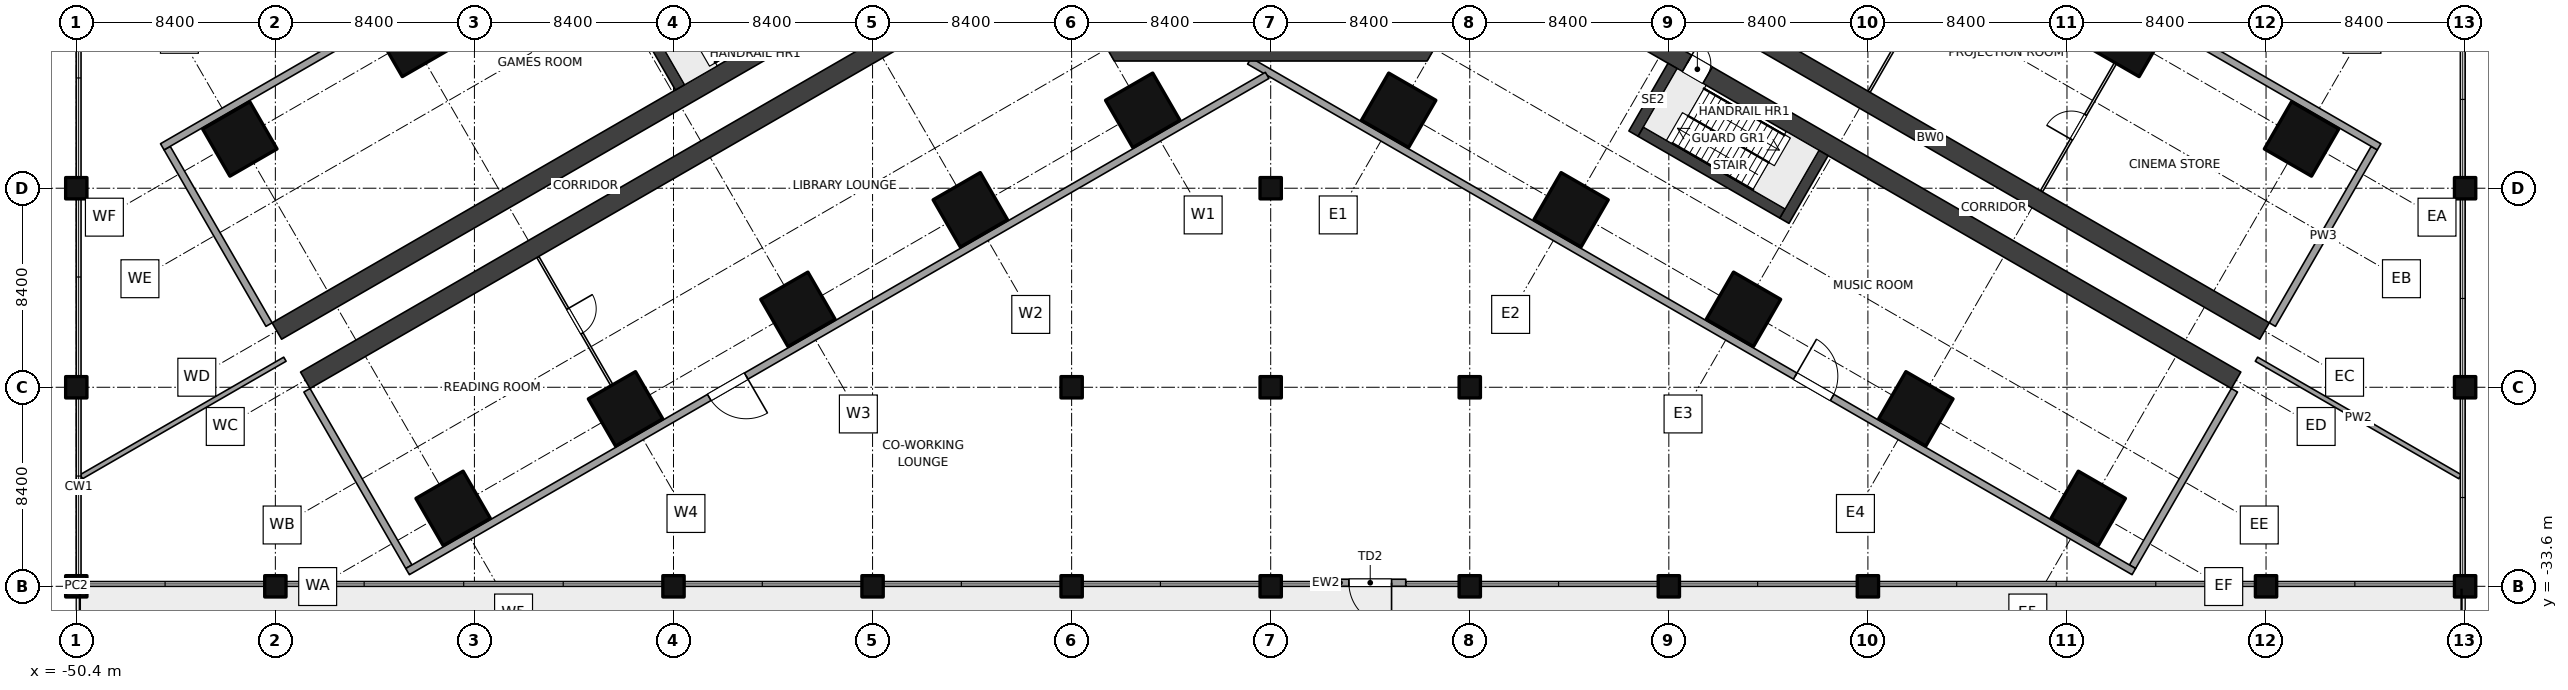
"""IFC4 building model, lengths in metres.
Left out: names, types, materials, properties, quantities, classifications, styles, units other than length and angle.
Written with IfcOpenShell. Run it as: python <this file> out.ifc"""

import sys

from ifc_helpers import new_model, si_unit, direction, frame, frame_2d, origin, origin_2d, place, context, subcontext, project, spatial, polyline, rectangle, outline, extrude, element, fill, save


model = new_model("IFC4")
c1 = context("Model", 3, precision=1e-05, world=origin(), true_north=direction((0.0, 1.0)))
c2 = subcontext(c1, "Body", "Model", "MODEL_VIEW")
j1 = project(units=[si_unit("LENGTHUNIT", "METRE"), si_unit("PLANEANGLEUNIT", "RADIAN")], contexts=[c1])
p1 = place(None, origin())
s1 = spatial("IfcSite", under=j1, at=p1, CompositionType="ELEMENT")
p2 = place(p1, origin())
s2 = spatial("IfcBuilding", under=s1, at=p2, CompositionType="ELEMENT")
p3 = place(p2, frame((0.0, 0.0, 6.0)))
s3 = spatial("IfcBuildingStorey", under=s2, at=p3, CompositionType="ELEMENT", Elevation=6.0)
for number, where, z_axis, x_axis in (
    (1, (-5.4, -13.51, 0.0), (0.0, 0.0, 1.0), (-0.5, 0.866, 0.0)),
    (2, (-12.675, -17.71, 0.0), (0.0, 0.0, 1.0), (-0.5, 0.866, 0.0)),
    (3, (-19.949, -21.91, 0.0), (0.0, 0.0, 1.0), (-0.5, 0.866, 0.0)),
    (4, (-27.224, -26.11, 0.0), (0.0, 0.0, 1.0), (-0.5, 0.866, 0.0)),
    (5, (-36.224, -10.521, 0.0), (0.0, 0.0, 1.0), (-0.5, 0.866, 0.0)),
    (6, (-34.499, -30.31, 0.0), (0.0, 0.0, 1.0), (-0.5, 0.866, 0.0)),
    (7, (-43.499, -14.721, 0.0), (0.0, 0.0, 1.0), (-0.5, 0.866, 0.0)),
    (8, (5.4, -13.51, 0.0), (0.0, 0.0, 1.0), (-0.5, -0.866, 0.0)),
    (9, (12.675, -17.71, 0.0), (0.0, 0.0, 1.0), (-0.5, -0.866, 0.0)),
    (10, (19.949, -21.91, 0.0), (0.0, 0.0, 1.0), (-0.5, -0.866, 0.0)),
    (11, (36.224, -10.521, 0.0), (0.0, 0.0, 1.0), (-0.5, -0.866, 0.0)),
    (12, (27.224, -26.11, 0.0), (0.0, 0.0, 1.0), (-0.5, -0.866, 0.0)),
    (13, (43.499, -14.721, 0.0), (0.0, 0.0, 1.0), (-0.5, -0.866, 0.0)),
    (14, (34.499, -30.31, 0.0), (0.0, 0.0, 1.0), (-0.5, -0.866, 0.0)),
):
    element("IfcColumn", number, at=place(p3, frame(where, z_axis=z_axis, x_axis=x_axis)), inside=s3, PredefinedType="COLUMN", context=c2, shape_type="SweptSolid", body=[
        extrude(rectangle(XDim=2.3, YDim=2.3, at=origin_2d()), origin(), (0.0, 0.0, 1.0), 5.0),
    ])
for number, where, z_axis, x_axis in (
    (15, (-50.4, -33.6, 0.0), (0.0, 0.0, 1.0), (1.0, 0.0, 0.0)),
    (16, (-50.4, -25.2, 0.0), (0.0, 0.0, 1.0), (1.0, 0.0, 0.0)),
    (17, (-50.4, -16.8, 0.0), (0.0, 0.0, 1.0), (1.0, 0.0, 0.0)),
    (18, (-42.0, -33.6, 0.0), (0.0, 0.0, 1.0), (1.0, 0.0, 0.0)),
    (19, (-25.2, -33.6, 0.0), (0.0, 0.0, 1.0), (1.0, 0.0, 0.0)),
    (20, (-16.8, -33.6, 0.0), (0.0, 0.0, 1.0), (1.0, 0.0, 0.0)),
    (21, (-8.4, -33.6, 0.0), (0.0, 0.0, 1.0), (1.0, 0.0, 0.0)),
    (22, (-8.4, -25.2, 0.0), (0.0, 0.0, 1.0), (1.0, 0.0, 0.0)),
    (23, (0.0, -33.6, 0.0), (0.0, 0.0, 1.0), (1.0, 0.0, 0.0)),
    (24, (0.0, -25.2, 0.0), (0.0, 0.0, 1.0), (1.0, 0.0, 0.0)),
    (25, (0.0, -16.8, 0.0), (0.0, 0.0, 1.0), (1.0, 0.0, 0.0)),
    (26, (8.4, -33.6, 0.0), (0.0, 0.0, 1.0), (1.0, 0.0, 0.0)),
    (27, (8.4, -25.2, 0.0), (0.0, 0.0, 1.0), (1.0, 0.0, 0.0)),
    (28, (16.8, -33.6, 0.0), (0.0, 0.0, 1.0), (1.0, 0.0, 0.0)),
    (29, (25.2, -33.6, 0.0), (0.0, 0.0, 1.0), (1.0, 0.0, 0.0)),
    (30, (42.0, -33.6, 0.0), (0.0, 0.0, 1.0), (1.0, 0.0, 0.0)),
    (31, (50.4, -33.6, 0.0), (0.0, 0.0, 1.0), (1.0, 0.0, 0.0)),
    (32, (50.4, -25.2, 0.0), (0.0, 0.0, 1.0), (1.0, 0.0, 0.0)),
    (33, (50.4, -16.8, 0.0), (0.0, 0.0, 1.0), (1.0, 0.0, 0.0)),
):
    element("IfcColumn", number, at=place(p3, frame(where, z_axis=z_axis, x_axis=x_axis)), inside=s3, PredefinedType="COLUMN", context=c2, shape_type="SweptSolid", body=[
        extrude(rectangle(XDim=0.9, YDim=0.9, at=origin_2d()), origin(), (0.0, 0.0, 1.0), 5.0),
    ])
p4 = place(p3, origin())
e34 = element("IfcWall", 34, at=p4, inside=s3, PredefinedType="SHEAR", context=c2, shape_type="SweptSolid", body=[
    extrude(outline(polyline([(-6.6, -11.432), (6.6, -11.432), (6.86, -10.981), (6.08, -10.531), (-6.08, -10.531), (-6.86, -10.981), (-6.6, -11.432)])), origin(), (0.0, 0.0, 1.0), 5.0),
])
p5 = place(p3, frame((-8.91, -6.53, 0.0), z_axis=(0.0, 0.0, 1.0), x_axis=(-0.866025284237, -0.500000207062, 0.0)))
e35 = element("IfcWall", 35, at=p5, inside=s3, PredefinedType="SHEAR", context=c2, shape_type="SweptSolid", body=[
    extrude(rectangle(XDim=36.75, YDim=0.8, at=frame_2d((18.375, 0.0))), origin(), (0.0, 0.0, 1.0), 5.0),
])
p6 = place(p5, frame((2.85, 0.0, 0.0)))
e36 = element("IfcOpeningElement", 36, at=p6, cuts=e35, PredefinedType="OPENING", context=c2, shape_type="SweptSolid", body=[
    extrude(rectangle(XDim=1.2, YDim=2.1, at=frame_2d((0.6, 1.05))), frame((0.0, 0.41, 0.0), z_axis=(0.0, -1.0, 0.0), x_axis=(1.0, 0.0, 0.0)), (0.0, 0.0, 1.0), 0.82),
])
p7 = place(p3, frame((-10.11, -4.451, 0.0), z_axis=(0.0, 0.0, 1.0), x_axis=(-0.866025284237, -0.500000207062, 0.0)))
e37 = element("IfcWall", 37, at=p7, inside=s3, PredefinedType="SHEAR", context=c2, shape_type="SweptSolid", body=[
    extrude(rectangle(XDim=36.75, YDim=0.8, at=frame_2d((18.375, 0.0))), origin(), (0.0, 0.0, 1.0), 5.0),
])
p8 = place(p7, frame((10.0, 0.0, 0.0)))
e38 = element("IfcOpeningElement", 38, at=p8, cuts=e37, PredefinedType="OPENING", context=c2, shape_type="SweptSolid", body=[
    extrude(rectangle(XDim=1.0, YDim=2.1, at=frame_2d((0.5, 1.05))), frame((0.0, 0.41, 0.0), z_axis=(0.0, -1.0, 0.0), x_axis=(1.0, 0.0, 0.0)), (0.0, 0.0, 1.0), 0.82),
])
p9 = place(p7, frame((2.85, 0.0, 0.0)))
e39 = element("IfcOpeningElement", 39, at=p9, cuts=e37, PredefinedType="OPENING", context=c2, shape_type="SweptSolid", body=[
    extrude(rectangle(XDim=1.2, YDim=2.1, at=frame_2d((0.6, 1.05))), frame((0.0, 0.41, 0.0), z_axis=(0.0, -1.0, 0.0), x_axis=(1.0, 0.0, 0.0)), (0.0, 0.0, 1.0), 0.82),
])
p10 = place(p3, frame((10.11, -4.451, 0.0), z_axis=(0.0, 0.0, 1.0), x_axis=(0.866025284237, -0.500000207062, 0.0)))
e40 = element("IfcWall", 40, at=p10, inside=s3, PredefinedType="SHEAR", context=c2, shape_type="SweptSolid", body=[
    extrude(rectangle(XDim=36.75, YDim=0.8, at=frame_2d((18.375, 0.0))), origin(), (0.0, 0.0, 1.0), 5.0),
])
p11 = place(p10, frame((2.85, 0.0, 0.0)))
e41 = element("IfcOpeningElement", 41, at=p11, cuts=e40, PredefinedType="OPENING", context=c2, shape_type="SweptSolid", body=[
    extrude(rectangle(XDim=1.2, YDim=2.1, at=frame_2d((0.6, 1.05))), frame((0.0, 0.41, 0.0), z_axis=(0.0, -1.0, 0.0), x_axis=(1.0, 0.0, 0.0)), (0.0, 0.0, 1.0), 0.82),
])
p12 = place(p3, frame((8.91, -6.53, 0.0), z_axis=(0.0, 0.0, 1.0), x_axis=(0.866025284237, -0.500000207062, 0.0)))
e42 = element("IfcWall", 42, at=p12, inside=s3, PredefinedType="SHEAR", context=c2, shape_type="SweptSolid", body=[
    extrude(rectangle(XDim=36.75, YDim=0.8, at=frame_2d((18.375, 0.0))), origin(), (0.0, 0.0, 1.0), 5.0),
])
p13 = place(p12, frame((10.0, 0.0, 0.0)))
e43 = element("IfcOpeningElement", 43, at=p13, cuts=e42, PredefinedType="OPENING", context=c2, shape_type="SweptSolid", body=[
    extrude(rectangle(XDim=1.0, YDim=2.1, at=frame_2d((0.5, 1.05))), frame((0.0, 0.41, 0.0), z_axis=(0.0, -1.0, 0.0), x_axis=(1.0, 0.0, 0.0)), (0.0, 0.0, 1.0), 0.82),
])
p14 = place(p12, frame((2.85, 0.0, 0.0)))
e44 = element("IfcOpeningElement", 44, at=p14, cuts=e42, PredefinedType="OPENING", context=c2, shape_type="SweptSolid", body=[
    extrude(rectangle(XDim=1.2, YDim=2.1, at=frame_2d((0.6, 1.05))), frame((0.0, 0.41, 0.0), z_axis=(0.0, -1.0, 0.0), x_axis=(1.0, 0.0, 0.0)), (0.0, 0.0, 1.0), 0.82),
])
p15 = place(p3, frame((5.7, -33.45, 0.0), z_axis=(0.0, 0.0, 1.0), x_axis=(-1.0, 0.0, 0.0)))
e45 = element("IfcWall", 45, at=p15, inside=s3, PredefinedType="SOLIDWALL", context=c2, shape_type="SweptSolid", body=[
    extrude(rectangle(XDim=3.0, YDim=0.3, at=frame_2d((1.5, 0.0))), origin(), (0.0, 0.0, 1.0), 3.7),
])
p16 = place(p15, frame((0.6, 0.0, 0.0)))
e46 = element("IfcOpeningElement", 46, at=p16, cuts=e45, PredefinedType="OPENING", context=c2, shape_type="SweptSolid", body=[
    extrude(rectangle(XDim=1.8, YDim=2.4, at=frame_2d((0.9, 1.2))), frame((0.0, 0.16, 0.0), z_axis=(0.0, -1.0, 0.0), x_axis=(1.0, 0.0, 0.0)), (0.0, 0.0, 1.0), 0.32),
])
p17 = place(p3, frame((-30.924, -19.701, 0.0), z_axis=(0.0, 0.0, 1.0), x_axis=(0.500004234368, -0.866022959057, 0.0)))
e47 = element("IfcWall", 47, at=p17, inside=s3, PredefinedType="PARTITIONING", context=c2, shape_type="SweptSolid", body=[
    extrude(rectangle(XDim=6.25, YDim=0.1, at=frame_2d((3.125, 0.0))), origin(), (0.0, 0.0, 1.0), 2.9),
])
p18 = place(p17, frame((2.525, 0.0, 0.0)))
e48 = element("IfcOpeningElement", 48, at=p18, cuts=e47, PredefinedType="OPENING", context=c2, shape_type="SweptSolid", body=[
    extrude(rectangle(XDim=1.2, YDim=2.1, at=frame_2d((0.6, 1.05))), frame((0.0, 0.06, 0.0), z_axis=(0.0, -1.0, 0.0), x_axis=(1.0, 0.0, 0.0)), (0.0, 0.0, 1.0), 0.12),
])
p19 = place(p3, frame((25.249, -12.73, 0.0), z_axis=(0.0, 0.0, 1.0), x_axis=(0.499987320047, 0.866032724435, 0.0)))
e49 = element("IfcWall", 49, at=p19, inside=s3, PredefinedType="PARTITIONING", context=c2, shape_type="SweptSolid", body=[
    extrude(rectangle(XDim=6.25, YDim=0.1, at=frame_2d((3.125, 0.0))), origin(), (0.0, 0.0, 1.0), 2.9),
])
p20 = place(p19, frame((2.525, 0.0, 0.0)))
e50 = element("IfcOpeningElement", 50, at=p20, cuts=e49, PredefinedType="OPENING", context=c2, shape_type="SweptSolid", body=[
    extrude(rectangle(XDim=1.2, YDim=2.1, at=frame_2d((0.6, 1.05))), frame((0.0, 0.06, 0.0), z_axis=(0.0, -1.0, 0.0), x_axis=(1.0, 0.0, 0.0)), (0.0, 0.0, 1.0), 0.12),
])
p21 = place(p3, frame((32.524, -16.93, 0.0), z_axis=(0.0, 0.0, 1.0), x_axis=(0.500004234368, 0.866022959057, 0.0)))
e51 = element("IfcWall", 51, at=p21, inside=s3, PredefinedType="PARTITIONING", context=c2, shape_type="SweptSolid", body=[
    extrude(rectangle(XDim=6.25, YDim=0.1, at=frame_2d((3.125, 0.0))), origin(), (0.0, 0.0, 1.0), 2.9),
])
p22 = place(p21, frame((2.525, 0.0, 0.0)))
e52 = element("IfcOpeningElement", 52, at=p22, cuts=e51, PredefinedType="OPENING", context=c2, shape_type="SweptSolid", body=[
    extrude(rectangle(XDim=1.2, YDim=2.1, at=frame_2d((0.6, 1.05))), frame((0.0, 0.06, 0.0), z_axis=(0.0, -1.0, 0.0), x_axis=(1.0, 0.0, 0.0)), (0.0, 0.0, 1.0), 0.12),
])
for number, where, z_axis, x_axis in (
    (53, (-41.596, -24.016, 0.0), (0.0, 0.0, 1.0), (-0.866, -0.5, 0.0)),
    (54, (41.596, -24.016, 0.0), (0.0, 0.0, 1.0), (0.866, -0.5, 0.0)),
):
    element("IfcWall", number, at=place(p3, frame(where, z_axis=z_axis, x_axis=x_axis)), inside=s3, PredefinedType="SOLIDWALL", context=c2, shape_type="SweptSolid", body=[
        extrude(rectangle(XDim=9.919, YDim=0.2, at=frame_2d((4.96, 0.0))), origin(), (0.0, 0.0, 1.0), 4.7),
    ])
for number, where, z_axis, x_axis in (
    (55, (-40.667, -25.326, 0.0), (0.0, 0.0, 1.0), (0.5, -0.866, 0.0)),
    (56, (-42.267, -22.555, 0.0), (0.0, 0.0, 1.0), (-0.5, 0.866, 0.0)),
    (57, (42.267, -22.555, 0.0), (0.0, 0.0, 1.0), (0.5, 0.866, 0.0)),
    (58, (40.667, -25.326, 0.0), (0.0, 0.0, 1.0), (-0.5, -0.866, 0.0)),
):
    element("IfcWall", number, at=place(p3, frame(where, z_axis=z_axis, x_axis=x_axis)), inside=s3, PredefinedType="SOLIDWALL", context=c2, shape_type="SweptSolid", body=[
        extrude(rectangle(XDim=8.6, YDim=0.3, at=frame_2d((4.3, 0.0))), origin(), (0.0, 0.0, 1.0), 3.1),
    ])
p23 = place(p3, frame((-0.15, -12.038, 0.0), z_axis=(0.0, 0.0, 1.0), x_axis=(-0.866026292622, -0.499998460486, 0.0)))
e59 = element("IfcWall", 59, at=p23, inside=s3, PredefinedType="SOLIDWALL", context=c2, shape_type="SweptSolid", body=[
    extrude(rectangle(XDim=41.883, YDim=0.3, at=frame_2d((20.941, 0.0))), origin(), (0.0, 0.0, 1.0), 4.7),
])
p24 = place(p23, frame((25.383, 0.0, 0.0)))
e60 = element("IfcOpeningElement", 60, at=p24, cuts=e59, PredefinedType="OPENING", context=c2, shape_type="SweptSolid", body=[
    extrude(rectangle(XDim=1.8, YDim=2.4, at=frame_2d((0.9, 1.2))), frame((0.0, 0.16, 0.0), z_axis=(0.0, -1.0, 0.0), x_axis=(1.0, 0.0, 0.0)), (0.0, 0.0, 1.0), 0.32),
])
p25 = place(p3, frame((-9.45, 6.495, 0.0), z_axis=(0.0, 0.0, 1.0), x_axis=(-0.866025301493, -0.500000177174, 0.0)))
e61 = element("IfcWall", 61, at=p25, inside=s3, PredefinedType="SOLIDWALL", context=c2, shape_type="SweptSolid", body=[
    extrude(rectangle(XDim=43.095, YDim=0.3, at=frame_2d((21.548, 0.0))), origin(), (0.0, 0.0, 1.0), 4.7),
])
p26 = place(p25, frame((26.595, 0.0, 0.0)))
e62 = element("IfcOpeningElement", 62, at=p26, cuts=e61, PredefinedType="OPENING", context=c2, shape_type="SweptSolid", body=[
    extrude(rectangle(XDim=1.8, YDim=2.4, at=frame_2d((0.9, 1.2))), frame((0.0, 0.16, 0.0), z_axis=(0.0, -1.0, 0.0), x_axis=(1.0, 0.0, 0.0)), (0.0, 0.0, 1.0), 0.32),
])
p27 = place(p3, frame((9.45, 6.495, 0.0), z_axis=(0.0, 0.0, 1.0), x_axis=(0.866025301493, -0.500000177174, 0.0)))
e63 = element("IfcWall", 63, at=p27, inside=s3, PredefinedType="SOLIDWALL", context=c2, shape_type="SweptSolid", body=[
    extrude(rectangle(XDim=43.095, YDim=0.3, at=frame_2d((21.548, 0.0))), origin(), (0.0, 0.0, 1.0), 4.7),
])
p28 = place(p27, frame((26.595, 0.0, 0.0)))
e64 = element("IfcOpeningElement", 64, at=p28, cuts=e63, PredefinedType="OPENING", context=c2, shape_type="SweptSolid", body=[
    extrude(rectangle(XDim=1.8, YDim=2.4, at=frame_2d((0.9, 1.2))), frame((0.0, 0.16, 0.0), z_axis=(0.0, -1.0, 0.0), x_axis=(1.0, 0.0, 0.0)), (0.0, 0.0, 1.0), 0.32),
])
p29 = place(p3, frame((-0.9, -11.432, 0.0), z_axis=(0.0, 0.0, 1.0), x_axis=(0.866025301493, -0.500000177174, 0.0)))
e65 = element("IfcWall", 65, at=p29, inside=s3, PredefinedType="SOLIDWALL", context=c2, shape_type="SweptSolid", body=[
    extrude(rectangle(XDim=43.095, YDim=0.3, at=frame_2d((21.548, 0.0))), origin(), (0.0, 0.0, 1.0), 4.7),
])
p30 = place(p29, frame((26.595, 0.0, 0.0)))
e66 = element("IfcOpeningElement", 66, at=p30, cuts=e65, PredefinedType="OPENING", context=c2, shape_type="SweptSolid", body=[
    extrude(rectangle(XDim=1.8, YDim=2.4, at=frame_2d((0.9, 1.2))), frame((0.0, 0.16, 0.0), z_axis=(0.0, -1.0, 0.0), x_axis=(1.0, 0.0, 0.0)), (0.0, 0.0, 1.0), 0.32),
])
for number, where, z_axis, x_axis in (
    (67, (-24.925, -12.543, 0.0), (0.0, 0.0, 1.0), (-0.5, 0.866, 0.0)),
    (68, (16.959, -11.639, 0.0), (0.0, 0.0, 1.0), (-0.5, -0.866, 0.0)),
    (69, (23.324, -15.314, 0.0), (0.0, 0.0, 1.0), (-0.5, -0.866, 0.0)),
):
    element("IfcWall", number, at=place(p3, frame(where, z_axis=z_axis, x_axis=x_axis)), inside=s3, PredefinedType="SOLIDWALL", context=c2, shape_type="SweptSolid", body=[
        extrude(rectangle(XDim=3.3, YDim=0.45, at=frame_2d((1.65, 0.0))), origin(), (0.0, 0.0, 1.0), 5.0),
    ])
p31 = place(p3, frame((15.616, -14.415, 0.0), z_axis=(0.0, 0.0, 1.0), x_axis=(0.866028853923, -0.499994024137, 0.0)))
e70 = element("IfcWall", 70, at=p31, inside=s3, PredefinedType="SOLIDWALL", context=c2, shape_type="SweptSolid", body=[
    extrude(rectangle(XDim=6.9, YDim=0.45, at=frame_2d((3.45, 0.0))), origin(), (0.0, 0.0, 1.0), 5.0),
])
p32 = place(p16, origin())
e71 = element("IfcDoor", 71, at=p32, inside=s3, OperationType="DOUBLE_DOOR_SINGLE_SWING", PredefinedType="DOOR", context=c2, shape_type="SweptSolid", body=[
    extrude(rectangle(XDim=1.8, YDim=2.4, at=frame_2d((0.9, 1.2))), frame((0.0, 0.025, 0.0), z_axis=(0.0, -1.0, 0.0), x_axis=(1.0, 0.0, 0.0)), (0.0, 0.0, 1.0), 0.05),
])
fill(e46, e71)
p33 = place(p18, origin())
e72 = element("IfcDoor", 72, at=p33, inside=s3, OperationType="DOUBLE_SWING_LEFT", PredefinedType="DOOR", context=c2, shape_type="SweptSolid", body=[
    extrude(rectangle(XDim=1.2, YDim=2.1, at=frame_2d((0.6, 1.05))), frame((0.0, 0.025, 0.0), z_axis=(0.0, -1.0, 0.0), x_axis=(1.0, 0.0, 0.0)), (0.0, 0.0, 1.0), 0.05),
])
fill(e48, e72)
p34 = place(p13, origin())
e73 = element("IfcDoor", 73, at=p34, inside=s3, OperationType="SINGLE_SWING_LEFT", PredefinedType="DOOR", context=c2, shape_type="SweptSolid", body=[
    extrude(rectangle(XDim=1.0, YDim=2.1, at=frame_2d((0.5, 1.05))), frame((0.0, 0.025, 0.0), z_axis=(0.0, -1.0, 0.0), x_axis=(1.0, 0.0, 0.0)), (0.0, 0.0, 1.0), 0.05),
])
fill(e43, e73)
p35 = place(p22, origin())
e74 = element("IfcDoor", 74, at=p35, inside=s3, OperationType="DOUBLE_SWING_LEFT", PredefinedType="DOOR", context=c2, shape_type="SweptSolid", body=[
    extrude(rectangle(XDim=1.2, YDim=2.1, at=frame_2d((0.6, 1.05))), frame((0.0, 0.025, 0.0), z_axis=(0.0, -1.0, 0.0), x_axis=(1.0, 0.0, 0.0)), (0.0, 0.0, 1.0), 0.05),
])
fill(e52, e74)
p36 = place(p24, origin())
e75 = element("IfcDoor", 75, at=p36, inside=s3, OperationType="DOUBLE_DOOR_DOUBLE_SWING", PredefinedType="DOOR", context=c2, shape_type="SweptSolid", body=[
    extrude(rectangle(XDim=1.8, YDim=2.4, at=frame_2d((0.9, 1.2))), frame((0.0, 0.025, 0.0), z_axis=(0.0, -1.0, 0.0), x_axis=(1.0, 0.0, 0.0)), (0.0, 0.0, 1.0), 0.05),
])
fill(e60, e75)
p37 = place(p30, origin())
e76 = element("IfcDoor", 76, at=p37, inside=s3, OperationType="DOUBLE_DOOR_DOUBLE_SWING", PredefinedType="DOOR", context=c2, shape_type="SweptSolid", body=[
    extrude(rectangle(XDim=1.8, YDim=2.4, at=frame_2d((0.9, 1.2))), frame((0.0, 0.025, 0.0), z_axis=(0.0, -1.0, 0.0), x_axis=(1.0, 0.0, 0.0)), (0.0, 0.0, 1.0), 0.05),
])
fill(e66, e76)
save(model, sys.argv[1])
